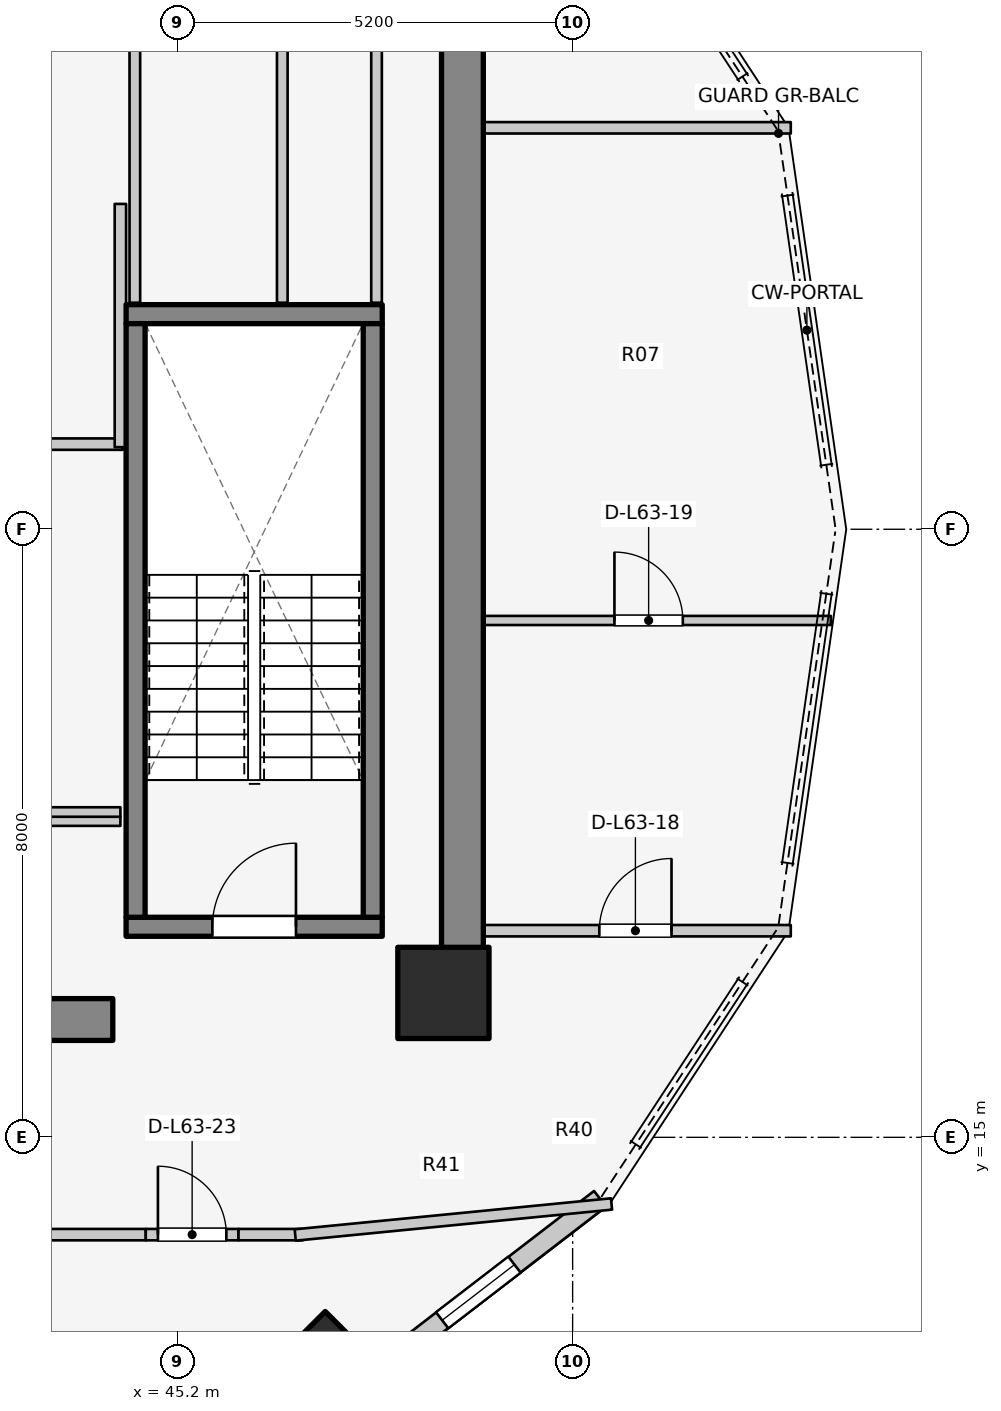
"""IFC4 building model, lengths in metres.
Left out: names, types, materials, properties, quantities, classifications, styles, units other than length and angle.
Written with IfcOpenShell. Run it as: python <this file> out.ifc"""

import sys

from ifc_helpers import new_model, si_unit, direction, frame, frame_2d, origin, origin_2d, place, context, subcontext, project, spatial, rectangle, extrude, element, fill, save


model = new_model("IFC4")
c1 = context("Model", 3, precision=1e-05, world=origin(), true_north=direction((0.0, 1.0)))
c2 = subcontext(c1, "Body", "Model", "MODEL_VIEW")
j1 = project(units=[si_unit("LENGTHUNIT", "METRE"), si_unit("PLANEANGLEUNIT", "RADIAN")], contexts=[c1])
p1 = place(None, origin())
s1 = spatial("IfcSite", under=j1, at=p1, CompositionType="ELEMENT")
p2 = place(p1, origin())
s2 = spatial("IfcBuilding", under=s1, at=p2, CompositionType="ELEMENT")
p3 = place(p2, frame((0.0, 0.0, 207.8)))
s3 = spatial("IfcBuildingStorey", under=s2, at=p3, CompositionType="ELEMENT", Elevation=207.8)
p4 = place(p3, frame((48.95, 17.05, 0.0), z_axis=(0.0, 0.0, 1.0), x_axis=(0.0, 1.0, 0.0)))
e1 = element("IfcWall", 1, at=p4, inside=s3, PredefinedType="SHEAR", context=c2, shape_type="SweptSolid", body=[
    extrude(rectangle(XDim=12.8, YDim=0.55, at=frame_2d((6.4, 0.0))), origin(), (0.0, 0.0, 1.0), 3.1),
])
p5 = place(p3, frame((39.85, 16.55, 0.0), z_axis=(0.0, 0.0, 1.0), x_axis=(1.0, 0.0, 0.0)))
e2 = element("IfcWall", 2, at=p5, inside=s3, PredefinedType="SHEAR", context=c2, shape_type="SweptSolid", body=[
    extrude(rectangle(XDim=4.5, YDim=0.55, at=frame_2d((2.25, 0.0))), origin(), (0.0, 0.0, 1.0), 3.1),
])
p6 = place(p3, frame((44.525, 17.77, 0.0), z_axis=(0.0, 0.0, 1.0), x_axis=(1.0, 0.0, 0.0)))
e3 = element("IfcWall", 3, at=p6, inside=s3, PredefinedType="SOLIDWALL", context=c2, shape_type="SweptSolid", body=[
    extrude(rectangle(XDim=3.37, YDim=0.25, at=frame_2d((1.685, 0.0))), origin(), (0.0, 0.0, 1.0), 3.1),
])
p7 = place(p6, frame((1.135, 0.0, 0.0)))
e4 = element("IfcOpeningElement", 4, at=p7, cuts=e3, PredefinedType="OPENING", context=c2, shape_type="SweptSolid", body=[
    extrude(rectangle(XDim=1.1, YDim=2.1, at=frame_2d((0.55, 1.05))), frame((0.0, 0.135, 0.0), z_axis=(0.0, -1.0, 0.0), x_axis=(1.0, 0.0, 0.0)), (0.0, 0.0, 1.0), 0.27),
])
p8 = place(p3, frame((44.525, 25.83, 0.0), z_axis=(0.0, 0.0, 1.0), x_axis=(1.0, 0.0, 0.0)))
e5 = element("IfcWall", 5, at=p8, inside=s3, PredefinedType="SOLIDWALL", context=c2, shape_type="SweptSolid", body=[
    extrude(rectangle(XDim=3.37, YDim=0.25, at=frame_2d((1.685, 0.0))), origin(), (0.0, 0.0, 1.0), 3.1),
])
for number, where, z_axis, x_axis in (
    (6, (44.65, 17.895, 0.0), (0.0, 0.0, 1.0), (0.0, 1.0, 0.0)),
    (7, (47.77, 17.895, 0.0), (0.0, 0.0, 1.0), (0.0, 1.0, 0.0)),
):
    element("IfcWall", number, at=place(p3, frame(where, z_axis=z_axis, x_axis=x_axis)), inside=s3, PredefinedType="SOLIDWALL", context=c2, shape_type="SweptSolid", body=[
        extrude(rectangle(XDim=7.81, YDim=0.25, at=frame_2d((3.905, 0.0))), origin(), (0.0, 0.0, 1.0), 3.1),
    ])
p9 = place(p3, frame((48.7, 16.9, 0.0), z_axis=(0.0, 0.0, 1.0), x_axis=(1.0, 0.0, 0.0)))
e8 = element("IfcColumn", 8, at=p9, inside=s3, PredefinedType="COLUMN", context=c2, shape_type="SweptSolid", body=[
    extrude(rectangle(XDim=1.2, YDim=1.2, at=origin_2d()), origin(), (0.0, 0.0, 1.0), 3.1),
])
p10 = place(p3, frame((47.145, 12.143, 0.0), z_axis=(0.0, 0.0, 1.0), x_axis=(0.707106781187, -0.707106781187, 0.0)))
e9 = element("IfcColumn", 9, at=p10, inside=s3, PredefinedType="COLUMN", context=c2, shape_type="SweptSolid", body=[
    extrude(rectangle(XDim=0.8, YDim=0.8, at=origin_2d()), origin(), (0.0, 0.0, 1.0), 3.1),
])
p11 = place(p3, frame((47.558, 11.728, 0.0), z_axis=(0.0, 0.0, 1.0), x_axis=(0.792713817907, 0.609593965603, 0.0)))
e10 = element("IfcWall", 10, at=p11, inside=s3, PredefinedType="STANDARD", context=c2, shape_type="SweptSolid", body=[
    extrude(rectangle(XDim=4.041, YDim=0.26, at=frame_2d((2.021, 0.0))), origin(), (0.0, 0.0, 1.0), 1.22),
])
p12 = place(p11, frame((1.42, 0.0, 0.15)))
e11 = element("IfcOpeningElement", 11, at=p12, cuts=e10, PredefinedType="OPENING", context=c2, shape_type="SweptSolid", body=[
    extrude(rectangle(XDim=1.2, YDim=0.9, at=frame_2d((0.6, 0.45))), frame((0.0, 0.14, 0.0), z_axis=(0.0, -1.0, 0.0), x_axis=(1.0, 0.0, 0.0)), (0.0, 0.0, 1.0), 0.28),
])
p13 = place(p3, frame((39.4, 24.12, 0.0), z_axis=(0.0, 0.0, 1.0), x_axis=(1.0, 0.0, 0.0)))
e12 = element("IfcWall", 12, at=p13, inside=s3, PredefinedType="PARTITIONING", context=c2, shape_type="SweptSolid", body=[
    extrude(rectangle(XDim=5.08, YDim=0.15, at=frame_2d((2.54, 0.0))), origin(), (0.0, 0.0, 1.0), 2.12),
])
p14 = place(p3, frame((44.45, 24.08, 0.0), z_axis=(0.0, 0.0, 1.0), x_axis=(0.0, 1.0, 0.0)))
e13 = element("IfcWall", 13, at=p14, inside=s3, PredefinedType="PARTITIONING", context=c2, shape_type="SweptSolid", body=[
    extrude(rectangle(XDim=3.2, YDim=0.15, at=frame_2d((1.6, 0.0))), origin(), (0.0, 0.0, 1.0), 2.575),
])
p15 = place(p3, frame((39.58, 19.16, 0.0), z_axis=(0.0, 0.0, 1.0), x_axis=(1.0, 0.0, 0.0)))
e14 = element("IfcWall", 14, at=p15, inside=s3, PredefinedType="PARTITIONING", context=c2, shape_type="SweptSolid", body=[
    extrude(rectangle(XDim=4.87, YDim=0.125, at=frame_2d((2.435, 0.0))), origin(), (0.0, 0.0, 1.0), 2.12),
])
p16 = place(p15, frame((1.748, 0.0, 0.0)))
e15 = element("IfcOpeningElement", 15, at=p16, cuts=e14, PredefinedType="OPENING", context=c2, shape_type="SweptSolid", body=[
    extrude(rectangle(XDim=0.85, YDim=2.05, at=frame_2d((0.425, 1.025))), frame((0.0, 0.073, 0.0), z_axis=(0.0, -1.0, 0.0), x_axis=(1.0, 0.0, 0.0)), (0.0, 0.0, 1.0), 0.145),
])
p17 = place(p3, frame((42.24, 19.28, 0.0), z_axis=(0.0, 0.0, 1.0), x_axis=(1.0, 0.0, 0.0)))
e16 = element("IfcWall", 16, at=p17, inside=s3, PredefinedType="PARTITIONING", context=c2, shape_type="SweptSolid", body=[
    extrude(rectangle(XDim=2.21, YDim=0.125, at=frame_2d((1.105, 0.0))), origin(), (0.0, 0.0, 1.0), 2.12),
])
for number, where, z_axis, x_axis in (
    (17, (44.64, 25.98, 0.0), (0.0, 0.0, 1.0), (0.0, 1.0, 0.0)),
    (18, (46.58, 25.98, 0.0), (0.0, 0.0, 1.0), (0.0, 1.0, 0.0)),
    (19, (47.82, 25.98, 0.0), (0.0, 0.0, 1.0), (0.0, 1.0, 0.0)),
):
    element("IfcWall", number, at=place(p3, frame(where, z_axis=z_axis, x_axis=x_axis)), inside=s3, PredefinedType="PLUMBINGWALL", context=c2, shape_type="SweptSolid", body=[
        extrude(rectangle(XDim=3.88, YDim=0.14, at=frame_2d((1.94, 0.0))), origin(), (0.0, 0.0, 1.0), 2.575),
    ])
p18 = place(p3, frame((48.95, 17.719, 0.0), z_axis=(0.0, 0.0, 1.0), x_axis=(1.0, 0.0, 0.0)))
e20 = element("IfcWall", 20, at=p18, inside=s3, PredefinedType="PARTITIONING", context=c2, shape_type="SweptSolid", body=[
    extrude(rectangle(XDim=4.32, YDim=0.15, at=frame_2d((2.16, 0.0))), origin(), (0.0, 0.0, 1.0), 2.575),
])
p19 = place(p18, frame((1.801, 0.0, 0.0)))
e21 = element("IfcOpeningElement", 21, at=p19, cuts=e20, PredefinedType="OPENING", context=c2, shape_type="SweptSolid", body=[
    extrude(rectangle(XDim=0.95, YDim=2.1, at=frame_2d((0.475, 1.05))), frame((0.0, 0.085, 0.0), z_axis=(0.0, -1.0, 0.0), x_axis=(1.0, 0.0, 0.0)), (0.0, 0.0, 1.0), 0.17),
])
p20 = place(p3, frame((48.95, 28.281, 0.0), z_axis=(0.0, 0.0, 1.0), x_axis=(1.0, 0.0, 0.0)))
e22 = element("IfcWall", 22, at=p20, inside=s3, PredefinedType="PARTITIONING", context=c2, shape_type="SweptSolid", body=[
    extrude(rectangle(XDim=4.32, YDim=0.15, at=frame_2d((2.16, 0.0))), origin(), (0.0, 0.0, 1.0), 2.575),
])
p21 = place(p3, frame((48.95, 21.8, 0.0), z_axis=(0.0, 0.0, 1.0), x_axis=(1.0, 0.0, 0.0)))
e23 = element("IfcWall", 23, at=p21, inside=s3, PredefinedType="MOVABLE", context=c2, shape_type="SweptSolid", body=[
    extrude(rectangle(XDim=4.847, YDim=0.12, at=frame_2d((2.424, 0.0))), origin(), (0.0, 0.0, 1.0), 2.575),
])
p22 = place(p21, frame((2.0, 0.0, 0.0)))
e24 = element("IfcOpeningElement", 24, at=p22, cuts=e23, PredefinedType="OPENING", context=c2, shape_type="SweptSolid", body=[
    extrude(rectangle(XDim=0.9, YDim=2.1, at=frame_2d((0.45, 1.05))), frame((0.0, 0.07, 0.0), z_axis=(0.0, -1.0, 0.0), x_axis=(1.0, 0.0, 0.0)), (0.0, 0.0, 1.0), 0.14),
])
p23 = place(p3, frame((39.33, 13.72, 0.0), z_axis=(0.0, 0.0, 1.0), x_axis=(1.0, 0.0, 0.0)))
e25 = element("IfcWall", 25, at=p23, inside=s3, PredefinedType="PARTITIONING", context=c2, shape_type="SweptSolid", body=[
    extrude(rectangle(XDim=5.454, YDim=0.15, at=frame_2d((2.727, 0.0))), origin(), (0.0, 0.0, 1.0), 1.22),
])
p24 = place(p3, frame((44.784, 13.72, 0.0), z_axis=(0.0, 0.0, 1.0), x_axis=(1.0, 0.0, 0.0)))
e26 = element("IfcWall", 26, at=p24, inside=s3, PredefinedType="PARTITIONING", context=c2, shape_type="SweptSolid", body=[
    extrude(rectangle(XDim=1.22, YDim=0.15, at=frame_2d((0.61, 0.0))), origin(), (0.0, 0.0, 1.0), 2.16),
])
p25 = place(p24, frame((0.16, 0.0, 0.0)))
e27 = element("IfcOpeningElement", 27, at=p25, cuts=e26, PredefinedType="OPENING", context=c2, shape_type="SweptSolid", body=[
    extrude(rectangle(XDim=0.9, YDim=2.1, at=frame_2d((0.45, 1.05))), frame((0.0, 0.085, 0.0), z_axis=(0.0, -1.0, 0.0), x_axis=(1.0, 0.0, 0.0)), (0.0, 0.0, 1.0), 0.17),
])
p26 = place(p3, frame((46.004, 13.72, 0.0), z_axis=(0.0, 0.0, 1.0), x_axis=(1.0, 0.0, 0.0)))
e28 = element("IfcWall", 28, at=p26, inside=s3, PredefinedType="PARTITIONING", context=c2, shape_type="SweptSolid", body=[
    extrude(rectangle(XDim=0.846, YDim=0.15, at=frame_2d((0.423, 0.0))), origin(), (0.0, 0.0, 1.0), 2.575),
])
p27 = place(p3, frame((46.75, 13.715, 0.0), z_axis=(0.0, 0.0, 1.0), x_axis=(0.995223854991, 0.097619047609, 0.0)))
e29 = element("IfcWall", 29, at=p27, inside=s3, PredefinedType="PARTITIONING", context=c2, shape_type="SweptSolid", body=[
    extrude(rectangle(XDim=4.182, YDim=0.15, at=frame_2d((2.091, 0.0))), origin(), (0.0, 0.0, 1.0), 1.22),
])
p28 = place(p12, origin())
e30 = element("IfcWindow", 30, at=p28, inside=s3, PartitioningType="SINGLE_PANEL", PredefinedType="WINDOW", context=c2, shape_type="SweptSolid", body=[
    extrude(rectangle(XDim=1.2, YDim=0.9, at=frame_2d((0.6, 0.45))), frame((0.0, 0.03, 0.0), z_axis=(0.0, -1.0, 0.0), x_axis=(1.0, 0.0, 0.0)), (0.0, 0.0, 1.0), 0.06),
])
fill(e11, e30)
p29 = place(p7, origin())
e31 = element("IfcDoor", 31, at=p29, inside=s3, OperationType="SINGLE_SWING_RIGHT", PredefinedType="DOOR", context=c2, shape_type="SweptSolid", body=[
    extrude(rectangle(XDim=1.1, YDim=2.1, at=frame_2d((0.55, 1.05))), frame((0.0, 0.025, 0.0), z_axis=(0.0, -1.0, 0.0), x_axis=(1.0, 0.0, 0.0)), (0.0, 0.0, 1.0), 0.05),
])
fill(e4, e31)
p30 = place(p19, origin())
e32 = element("IfcDoor", 32, at=p30, inside=s3, OperationType="SINGLE_SWING_RIGHT", PredefinedType="DOOR", context=c2, shape_type="SweptSolid", body=[
    extrude(rectangle(XDim=0.95, YDim=2.1, at=frame_2d((0.475, 1.05))), frame((0.0, 0.025, 0.0), z_axis=(0.0, -1.0, 0.0), x_axis=(1.0, 0.0, 0.0)), (0.0, 0.0, 1.0), 0.05),
])
fill(e21, e32)
p31 = place(p22, origin())
e33 = element("IfcDoor", 33, at=p31, inside=s3, OperationType="SINGLE_SWING_LEFT", PredefinedType="DOOR", context=c2, shape_type="SweptSolid", body=[
    extrude(rectangle(XDim=0.9, YDim=2.1, at=frame_2d((0.45, 1.05))), frame((0.0, 0.025, 0.0), z_axis=(0.0, -1.0, 0.0), x_axis=(1.0, 0.0, 0.0)), (0.0, 0.0, 1.0), 0.05),
])
fill(e24, e33)
p32 = place(p25, origin())
e34 = element("IfcDoor", 34, at=p32, inside=s3, OperationType="SINGLE_SWING_LEFT", PredefinedType="DOOR", context=c2, shape_type="SweptSolid", body=[
    extrude(rectangle(XDim=0.9, YDim=2.1, at=frame_2d((0.45, 1.05))), frame((0.0, 0.025, 0.0), z_axis=(0.0, -1.0, 0.0), x_axis=(1.0, 0.0, 0.0)), (0.0, 0.0, 1.0), 0.05),
])
fill(e27, e34)
save(model, sys.argv[1])
